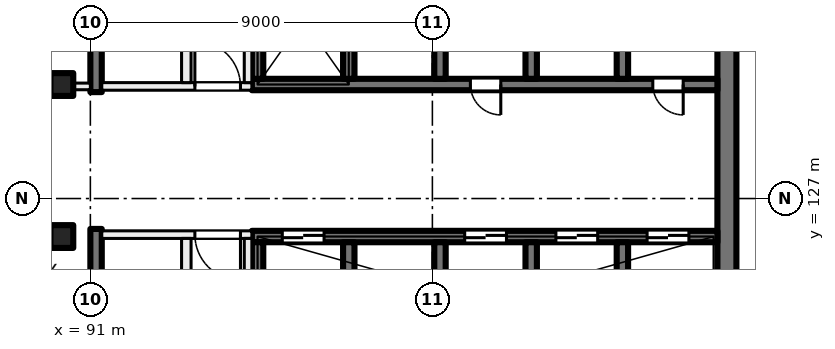
"""IFC4 building model, lengths in metres.
Left out: names, types, materials, properties, quantities, classifications, styles, units other than length and angle.
Written with IfcOpenShell. Run it as: python <this file> out.ifc"""

import sys

from ifc_helpers import new_model, si_unit, direction, frame, frame_2d, origin, origin_2d, place, context, subcontext, project, spatial, rectangle, extrude, element, fill, save


model = new_model("IFC4")
c1 = context("Model", 3, precision=1e-05, world=origin(), true_north=direction((0.0, 1.0)))
c2 = subcontext(c1, "Body", "Model", "MODEL_VIEW")
j1 = project(units=[si_unit("LENGTHUNIT", "METRE"), si_unit("PLANEANGLEUNIT", "RADIAN")], contexts=[c1])
p1 = place(None, origin())
s1 = spatial("IfcSite", under=j1, at=p1, CompositionType="ELEMENT")
p2 = place(p1, origin())
s2 = spatial("IfcBuilding", under=s1, at=p2, CompositionType="ELEMENT")
p3 = place(p2, frame((0.0, 0.0, 200.0)))
s3 = spatial("IfcBuildingStorey", under=s2, at=p3, CompositionType="ELEMENT", Elevation=200.0)
for number, where, z_axis, x_axis in (
    (1, (90.25, 130.0, 0.0), (0.0, 0.0, 1.0), (1.0, 0.0, 0.0)),
    (2, (90.25, 126.0, 0.0), (0.0, 0.0, 1.0), (1.0, 0.0, 0.0)),
):
    element("IfcColumn", number, at=place(p3, frame(where, z_axis=z_axis, x_axis=x_axis)), inside=s3, PredefinedType="COLUMN", context=c2, shape_type="SweptSolid", body=[
        extrude(rectangle(XDim=0.6, YDim=0.6, at=origin_2d()), origin(), (0.0, 0.0, 1.0), 4.0),
    ])
p4 = place(p3, frame((107.75, 135.2, 0.0), z_axis=(0.0, 0.0, 1.0), x_axis=(0.0, -1.0, 0.0)))
e3 = element("IfcWall", 3, at=p4, inside=s3, PredefinedType="SHEAR", context=c2, shape_type="SweptSolid", body=[
    extrude(rectangle(XDim=14.4, YDim=0.5, at=frame_2d((7.2, 0.0))), origin(), (0.0, 0.0, 1.0), 4.0),
])
p5 = place(p3, frame((107.5, 130.0, 0.0), z_axis=(0.0, 0.0, 1.0), x_axis=(-1.0, 0.0, 0.0)))
e4 = element("IfcWall", 4, at=p5, inside=s3, PredefinedType="SHEAR", context=c2, shape_type="SweptSolid", body=[
    extrude(rectangle(XDim=12.25, YDim=0.3, at=frame_2d((6.125, 0.0))), origin(), (0.0, 0.0, 1.0), 4.0),
])
p6 = place(p5, frame((0.9, 0.0, 0.0)))
e5 = element("IfcOpeningElement", 5, at=p6, cuts=e4, PredefinedType="OPENING", context=c2, shape_type="SweptSolid", body=[
    extrude(rectangle(XDim=0.8, YDim=2.1, at=frame_2d((0.4, 1.05))), frame((0.0, 0.16, 0.0), z_axis=(0.0, -1.0, 0.0), x_axis=(1.0, 0.0, 0.0)), (0.0, 0.0, 1.0), 0.32),
])
p7 = place(p5, frame((5.7, 0.0, 0.0)))
e6 = element("IfcOpeningElement", 6, at=p7, cuts=e4, PredefinedType="OPENING", context=c2, shape_type="SweptSolid", body=[
    extrude(rectangle(XDim=0.8, YDim=2.1, at=frame_2d((0.4, 1.05))), frame((0.0, 0.16, 0.0), z_axis=(0.0, -1.0, 0.0), x_axis=(1.0, 0.0, 0.0)), (0.0, 0.0, 1.0), 0.32),
])
for number, where, z_axis, x_axis in (
    (7, (105.0, 133.25, 0.0), (0.0, 0.0, 1.0), (0.0, -1.0, 0.0)),
    (8, (102.6, 133.25, 0.0), (0.0, 0.0, 1.0), (0.0, -1.0, 0.0)),
    (9, (100.2, 133.25, 0.0), (0.0, 0.0, 1.0), (0.0, -1.0, 0.0)),
    (10, (97.8, 133.25, 0.0), (0.0, 0.0, 1.0), (0.0, -1.0, 0.0)),
    (11, (95.4, 133.25, 0.0), (0.0, 0.0, 1.0), (0.0, -1.0, 0.0)),
):
    element("IfcWall", number, at=place(p3, frame(where, z_axis=z_axis, x_axis=x_axis)), inside=s3, PredefinedType="SHEAR", context=c2, shape_type="SweptSolid", body=[
        extrude(rectangle(XDim=3.1, YDim=0.3, at=frame_2d((1.55, 0.0))), origin(), (0.0, 0.0, 1.0), 4.0),
    ])
p8 = place(p3, frame((107.5, 126.0, 0.0), z_axis=(0.0, 0.0, 1.0), x_axis=(-1.0, 0.0, 0.0)))
e12 = element("IfcWall", 12, at=p8, inside=s3, PredefinedType="SHEAR", context=c2, shape_type="SweptSolid", body=[
    extrude(rectangle(XDim=12.25, YDim=0.3, at=frame_2d((6.125, 0.0))), origin(), (0.0, 0.0, 1.0), 4.0),
])
p9 = place(p8, frame((0.75, 0.0, 0.0)))
e13 = element("IfcOpeningElement", 13, at=p9, cuts=e12, PredefinedType="OPENING", context=c2, shape_type="SweptSolid", body=[
    extrude(rectangle(XDim=1.1, YDim=2.1, at=frame_2d((0.55, 1.05))), frame((0.0, 0.16, 0.0), z_axis=(0.0, -1.0, 0.0), x_axis=(1.0, 0.0, 0.0)), (0.0, 0.0, 1.0), 0.32),
])
p10 = place(p8, frame((3.15, 0.0, 0.0)))
e14 = element("IfcOpeningElement", 14, at=p10, cuts=e12, PredefinedType="OPENING", context=c2, shape_type="SweptSolid", body=[
    extrude(rectangle(XDim=1.1, YDim=2.1, at=frame_2d((0.55, 1.05))), frame((0.0, 0.16, 0.0), z_axis=(0.0, -1.0, 0.0), x_axis=(1.0, 0.0, 0.0)), (0.0, 0.0, 1.0), 0.32),
])
p11 = place(p8, frame((5.55, 0.0, 0.0)))
e15 = element("IfcOpeningElement", 15, at=p11, cuts=e12, PredefinedType="OPENING", context=c2, shape_type="SweptSolid", body=[
    extrude(rectangle(XDim=1.1, YDim=2.1, at=frame_2d((0.55, 1.05))), frame((0.0, 0.16, 0.0), z_axis=(0.0, -1.0, 0.0), x_axis=(1.0, 0.0, 0.0)), (0.0, 0.0, 1.0), 0.32),
])
p12 = place(p8, frame((10.35, 0.0, 0.0)))
e16 = element("IfcOpeningElement", 16, at=p12, cuts=e12, PredefinedType="OPENING", context=c2, shape_type="SweptSolid", body=[
    extrude(rectangle(XDim=1.1, YDim=2.1, at=frame_2d((0.55, 1.05))), frame((0.0, 0.16, 0.0), z_axis=(0.0, -1.0, 0.0), x_axis=(1.0, 0.0, 0.0)), (0.0, 0.0, 1.0), 0.32),
])
for number, where, z_axis, x_axis in (
    (17, (105.0, 125.85, 0.0), (0.0, 0.0, 1.0), (0.0, -1.0, 0.0)),
    (18, (102.6, 125.85, 0.0), (0.0, 0.0, 1.0), (0.0, -1.0, 0.0)),
    (19, (100.2, 125.85, 0.0), (0.0, 0.0, 1.0), (0.0, -1.0, 0.0)),
    (20, (97.8, 125.85, 0.0), (0.0, 0.0, 1.0), (0.0, -1.0, 0.0)),
    (21, (95.4, 125.85, 0.0), (0.0, 0.0, 1.0), (0.0, -1.0, 0.0)),
):
    element("IfcWall", number, at=place(p3, frame(where, z_axis=z_axis, x_axis=x_axis)), inside=s3, PredefinedType="SHEAR", context=c2, shape_type="SweptSolid", body=[
        extrude(rectangle(XDim=3.1, YDim=0.3, at=frame_2d((1.55, 0.0))), origin(), (0.0, 0.0, 1.0), 4.0),
    ])
for number, where, z_axis, x_axis in (
    (22, (91.15, 138.5, 0.0), (0.0, 0.0, 1.0), (0.0, -1.0, 0.0)),
    (23, (91.15, 126.2, 0.0), (0.0, 0.0, 1.0), (0.0, -1.0, 0.0)),
):
    element("IfcWall", number, at=place(p3, frame(where, z_axis=z_axis, x_axis=x_axis)), inside=s3, PredefinedType="SHEAR", context=c2, shape_type="SweptSolid", body=[
        extrude(rectangle(XDim=8.7, YDim=0.3, at=frame_2d((4.35, 0.0))), origin(), (0.0, 0.0, 1.0), 4.0),
    ])
p13 = place(p3, frame((95.25, 126.05, 0.0), z_axis=(0.0, 0.0, 1.0), x_axis=(-1.0, 0.0, 0.0)))
e24 = element("IfcWall", 24, at=p13, inside=s3, PredefinedType="PARTITIONING", context=c2, shape_type="SweptSolid", body=[
    extrude(rectangle(XDim=3.95, YDim=0.2, at=frame_2d((1.975, 0.0))), origin(), (0.0, 0.0, 1.0), 3.625),
])
p14 = place(p13, frame((0.3, 0.0, 0.0)))
e25 = element("IfcOpeningElement", 25, at=p14, cuts=e24, PredefinedType="OPENING", context=c2, shape_type="SweptSolid", body=[
    extrude(rectangle(XDim=1.2, YDim=2.1, at=frame_2d((0.6, 1.05))), frame((0.0, 0.11, 0.0), z_axis=(0.0, -1.0, 0.0), x_axis=(1.0, 0.0, 0.0)), (0.0, 0.0, 1.0), 0.22),
])
p15 = place(p3, frame((95.15, 117.5, 0.0), z_axis=(0.0, 0.0, 1.0), x_axis=(0.0, 1.0, 0.0)))
e26 = element("IfcWall", 26, at=p15, inside=s3, PredefinedType="PARTITIONING", context=c2, shape_type="SweptSolid", body=[
    extrude(rectangle(XDim=8.45, YDim=0.2, at=frame_2d((4.225, 0.0))), origin(), (0.0, 0.0, 1.0), 3.625),
])
p16 = place(p15, frame((1.725, 0.0, 0.0)))
e27 = element("IfcOpeningElement", 27, at=p16, cuts=e26, PredefinedType="OPENING", context=c2, shape_type="SweptSolid", body=[
    extrude(rectangle(XDim=1.5, YDim=2.1, at=frame_2d((0.75, 1.05))), frame((0.0, 0.11, 0.0), z_axis=(0.0, -1.0, 0.0), x_axis=(1.0, 0.0, 0.0)), (0.0, 0.0, 1.0), 0.22),
])
p17 = place(p3, frame((93.525, 117.5, 0.0), z_axis=(0.0, 0.0, 1.0), x_axis=(0.0, 1.0, 0.0)))
e28 = element("IfcWall", 28, at=p17, inside=s3, PredefinedType="PARTITIONING", context=c2, shape_type="SweptSolid", body=[
    extrude(rectangle(XDim=8.45, YDim=0.25, at=frame_2d((4.225, 0.0))), origin(), (0.0, 0.0, 1.0), 3.625),
])
p18 = place(p17, frame((6.565, 0.0, 0.0)))
e29 = element("IfcOpeningElement", 29, at=p18, cuts=e28, PredefinedType="OPENING", context=c2, shape_type="SweptSolid", body=[
    extrude(rectangle(XDim=1.0, YDim=2.1, at=frame_2d((0.5, 1.05))), frame((0.0, 0.135, 0.0), z_axis=(0.0, -1.0, 0.0), x_axis=(1.0, 0.0, 0.0)), (0.0, 0.0, 1.0), 0.27),
])
p19 = place(p17, frame((2.39, 0.0, 0.0)))
e30 = element("IfcOpeningElement", 30, at=p19, cuts=e28, PredefinedType="OPENING", context=c2, shape_type="SweptSolid", body=[
    extrude(rectangle(XDim=0.8, YDim=2.1, at=frame_2d((0.4, 1.05))), frame((0.0, 0.135, 0.0), z_axis=(0.0, -1.0, 0.0), x_axis=(1.0, 0.0, 0.0)), (0.0, 0.0, 1.0), 0.27),
])
p20 = place(p3, frame((91.3, 129.95, 0.0), z_axis=(0.0, 0.0, 1.0), x_axis=(1.0, 0.0, 0.0)))
e31 = element("IfcWall", 31, at=p20, inside=s3, PredefinedType="PARTITIONING", context=c2, shape_type="SweptSolid", body=[
    extrude(rectangle(XDim=3.95, YDim=0.2, at=frame_2d((1.975, 0.0))), origin(), (0.0, 0.0, 1.0), 3.625),
])
p21 = place(p20, frame((2.45, 0.0, 0.0)))
e32 = element("IfcOpeningElement", 32, at=p21, cuts=e31, PredefinedType="OPENING", context=c2, shape_type="SweptSolid", body=[
    extrude(rectangle(XDim=1.2, YDim=2.1, at=frame_2d((0.6, 1.05))), frame((0.0, 0.11, 0.0), z_axis=(0.0, -1.0, 0.0), x_axis=(1.0, 0.0, 0.0)), (0.0, 0.0, 1.0), 0.22),
])
p22 = place(p3, frame((95.15, 130.05, 0.0), z_axis=(0.0, 0.0, 1.0), x_axis=(0.0, 1.0, 0.0)))
e33 = element("IfcWall", 33, at=p22, inside=s3, PredefinedType="PARTITIONING", context=c2, shape_type="SweptSolid", body=[
    extrude(rectangle(XDim=8.45, YDim=0.2, at=frame_2d((4.225, 0.0))), origin(), (0.0, 0.0, 1.0), 3.625),
])
p23 = place(p22, frame((5.225, 0.0, 0.0)))
e34 = element("IfcOpeningElement", 34, at=p23, cuts=e33, PredefinedType="OPENING", context=c2, shape_type="SweptSolid", body=[
    extrude(rectangle(XDim=1.5, YDim=2.1, at=frame_2d((0.75, 1.05))), frame((0.0, 0.11, 0.0), z_axis=(0.0, -1.0, 0.0), x_axis=(1.0, 0.0, 0.0)), (0.0, 0.0, 1.0), 0.22),
])
p24 = place(p3, frame((93.525, 130.05, 0.0), z_axis=(0.0, 0.0, 1.0), x_axis=(0.0, 1.0, 0.0)))
e35 = element("IfcWall", 35, at=p24, inside=s3, PredefinedType="PARTITIONING", context=c2, shape_type="SweptSolid", body=[
    extrude(rectangle(XDim=8.45, YDim=0.25, at=frame_2d((4.225, 0.0))), origin(), (0.0, 0.0, 1.0), 3.625),
])
p25 = place(p24, frame((0.985, 0.0, 0.0)))
e36 = element("IfcOpeningElement", 36, at=p25, cuts=e35, PredefinedType="OPENING", context=c2, shape_type="SweptSolid", body=[
    extrude(rectangle(XDim=0.8, YDim=2.1, at=frame_2d((0.4, 1.05))), frame((0.0, 0.135, 0.0), z_axis=(0.0, -1.0, 0.0), x_axis=(1.0, 0.0, 0.0)), (0.0, 0.0, 1.0), 0.27),
])
p26 = place(p24, frame((5.16, 0.0, 0.0)))
e37 = element("IfcOpeningElement", 37, at=p26, cuts=e35, PredefinedType="OPENING", context=c2, shape_type="SweptSolid", body=[
    extrude(rectangle(XDim=1.0, YDim=2.1, at=frame_2d((0.5, 1.05))), frame((0.0, 0.135, 0.0), z_axis=(0.0, -1.0, 0.0), x_axis=(1.0, 0.0, 0.0)), (0.0, 0.0, 1.0), 0.27),
])
p27 = place(p3, frame((85.838, 129.95, 0.0), z_axis=(0.0, 0.0, 1.0), x_axis=(1.0, 0.0, 0.0)))
e38 = element("IfcWall", 38, at=p27, inside=s3, PredefinedType="PARTITIONING", context=c2, shape_type="SweptSolid", body=[
    extrude(rectangle(XDim=5.162, YDim=0.175, at=frame_2d((2.581, 0.0))), origin(), (0.0, 0.0, 1.0), 3.625),
])
p28 = place(p27, frame((1.971, 0.0, 0.0)))
e39 = element("IfcOpeningElement", 39, at=p28, cuts=e38, PredefinedType="OPENING", context=c2, shape_type="SweptSolid", body=[
    extrude(rectangle(XDim=1.2, YDim=2.1, at=frame_2d((0.6, 1.05))), frame((0.0, 0.097, 0.0), z_axis=(0.0, -1.0, 0.0), x_axis=(1.0, 0.0, 0.0)), (0.0, 0.0, 1.0), 0.195),
])
p29 = place(p9, origin())
e40 = element("IfcDoor", 40, at=p29, inside=s3, OperationType="DOUBLE_DOOR_SLIDING", PredefinedType="DOOR", context=c2, shape_type="SweptSolid", body=[
    extrude(rectangle(XDim=1.1, YDim=2.1, at=frame_2d((0.55, 1.05))), frame((0.0, 0.025, 0.0), z_axis=(0.0, -1.0, 0.0), x_axis=(1.0, 0.0, 0.0)), (0.0, 0.0, 1.0), 0.05),
])
fill(e13, e40)
p30 = place(p10, origin())
e41 = element("IfcDoor", 41, at=p30, inside=s3, OperationType="DOUBLE_DOOR_SLIDING", PredefinedType="DOOR", context=c2, shape_type="SweptSolid", body=[
    extrude(rectangle(XDim=1.1, YDim=2.1, at=frame_2d((0.55, 1.05))), frame((0.0, 0.025, 0.0), z_axis=(0.0, -1.0, 0.0), x_axis=(1.0, 0.0, 0.0)), (0.0, 0.0, 1.0), 0.05),
])
fill(e14, e41)
p31 = place(p11, origin())
e42 = element("IfcDoor", 42, at=p31, inside=s3, OperationType="DOUBLE_DOOR_SLIDING", PredefinedType="DOOR", context=c2, shape_type="SweptSolid", body=[
    extrude(rectangle(XDim=1.1, YDim=2.1, at=frame_2d((0.55, 1.05))), frame((0.0, 0.025, 0.0), z_axis=(0.0, -1.0, 0.0), x_axis=(1.0, 0.0, 0.0)), (0.0, 0.0, 1.0), 0.05),
])
fill(e15, e42)
p32 = place(p12, origin())
e43 = element("IfcDoor", 43, at=p32, inside=s3, OperationType="DOUBLE_DOOR_SLIDING", PredefinedType="DOOR", context=c2, shape_type="SweptSolid", body=[
    extrude(rectangle(XDim=1.1, YDim=2.1, at=frame_2d((0.55, 1.05))), frame((0.0, 0.025, 0.0), z_axis=(0.0, -1.0, 0.0), x_axis=(1.0, 0.0, 0.0)), (0.0, 0.0, 1.0), 0.05),
])
fill(e16, e43)
p33 = place(p6, origin())
e44 = element("IfcDoor", 44, at=p33, inside=s3, OperationType="SINGLE_SWING_LEFT", PredefinedType="DOOR", context=c2, shape_type="SweptSolid", body=[
    extrude(rectangle(XDim=0.8, YDim=2.1, at=frame_2d((0.4, 1.05))), frame((0.0, 0.025, 0.0), z_axis=(0.0, -1.0, 0.0), x_axis=(1.0, 0.0, 0.0)), (0.0, 0.0, 1.0), 0.05),
])
fill(e5, e44)
p34 = place(p7, origin())
e45 = element("IfcDoor", 45, at=p34, inside=s3, OperationType="SINGLE_SWING_RIGHT", PredefinedType="DOOR", context=c2, shape_type="SweptSolid", body=[
    extrude(rectangle(XDim=0.8, YDim=2.1, at=frame_2d((0.4, 1.05))), frame((0.0, 0.025, 0.0), z_axis=(0.0, -1.0, 0.0), x_axis=(1.0, 0.0, 0.0)), (0.0, 0.0, 1.0), 0.05),
])
fill(e6, e45)
p35 = place(p14, origin())
e46 = element("IfcDoor", 46, at=p35, inside=s3, OperationType="DOUBLE_DOOR_SINGLE_SWING", PredefinedType="DOOR", context=c2, shape_type="SweptSolid", body=[
    extrude(rectangle(XDim=1.2, YDim=2.1, at=frame_2d((0.6, 1.05))), frame((0.0, 0.025, 0.0), z_axis=(0.0, -1.0, 0.0), x_axis=(1.0, 0.0, 0.0)), (0.0, 0.0, 1.0), 0.05),
])
fill(e25, e46)
p36 = place(p21, origin())
e47 = element("IfcDoor", 47, at=p36, inside=s3, OperationType="DOUBLE_DOOR_SINGLE_SWING", PredefinedType="DOOR", context=c2, shape_type="SweptSolid", body=[
    extrude(rectangle(XDim=1.2, YDim=2.1, at=frame_2d((0.6, 1.05))), frame((0.0, 0.025, 0.0), z_axis=(0.0, -1.0, 0.0), x_axis=(1.0, 0.0, 0.0)), (0.0, 0.0, 1.0), 0.05),
])
fill(e32, e47)
save(model, sys.argv[1])
